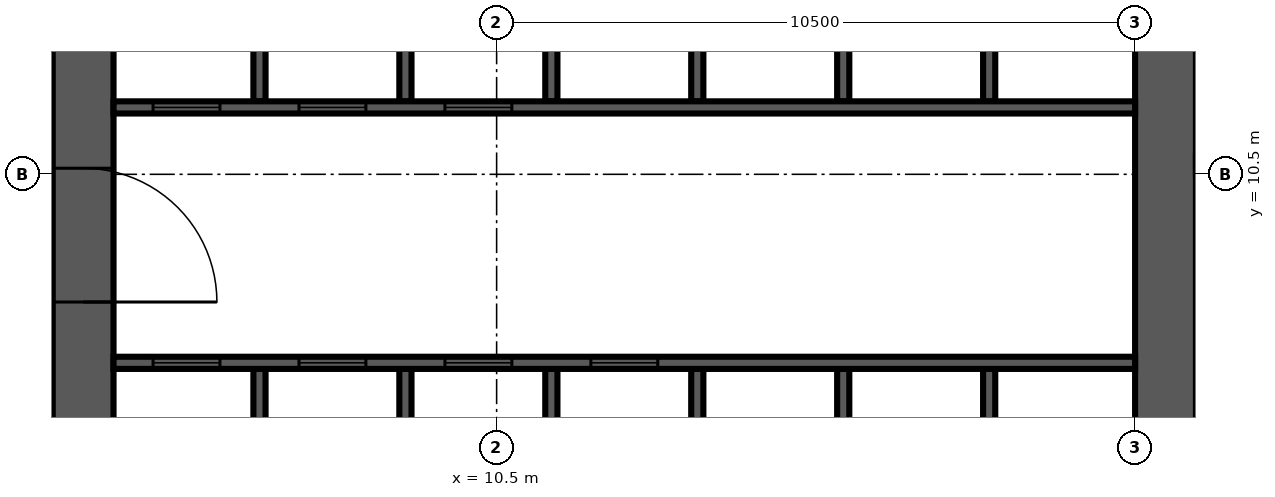
"""IFC4 building model, lengths in metres.
Left out: names, types, materials, properties, quantities, classifications, styles, units other than length and angle.
Written with IfcOpenShell. Run it as: python <this file> out.ifc"""

import sys

from ifc_helpers import new_model, si_unit, direction, frame, frame_2d, origin, place, context, subcontext, project, spatial, rectangle, extrude, source, transform, mapped, element, fill, save


model = new_model("IFC4")
c1 = context("Model", 3, precision=1e-05, world=origin(), true_north=direction((0.0, 1.0)))
c2 = subcontext(c1, "Body", "Model", "MODEL_VIEW")
j1 = project(units=[si_unit("LENGTHUNIT", "METRE"), si_unit("PLANEANGLEUNIT", "RADIAN")], contexts=[c1])
p1 = place(None, origin())
s1 = spatial("IfcSite", under=j1, at=p1, CompositionType="ELEMENT")
p2 = place(p1, origin())
s2 = spatial("IfcBuilding", under=s1, at=p2, CompositionType="ELEMENT")
p3 = place(p2, frame((0.0, 0.0, 149.7)))
s3 = spatial("IfcBuildingStorey", under=s2, at=p3, CompositionType="ELEMENT", Elevation=149.7)
m1 = source(origin(), c2, "Body", "SweptSolid", [
    extrude(rectangle(XDim=17.8, YDim=1.0, at=frame_2d((8.9, 0.0))), origin(), (0.0, 0.0, 1.0), 4.2),
])
p4 = place(p3, frame((3.7, 4.2, 0.0), z_axis=(0.0, 0.0, 1.0), x_axis=(0.0, 1.0, 0.0)))
e1 = element("IfcWall", 1, at=p4, inside=s3, PredefinedType="SHEAR", context=c2, shape_type="MappedRepresentation", body=[
    mapped(m1, transform((0.0, 0.0, 0.0), scale=1.0)),
])
m2 = source(origin(), c2, "Body", "SweptSolid", [
    extrude(rectangle(XDim=2.2, YDim=2.1, at=frame_2d((1.1, 1.05))), frame((0.0, 0.51, 0.0), z_axis=(0.0, -1.0, 0.0), x_axis=(1.0, 0.0, 0.0)), (0.0, 0.0, 1.0), 1.02),
])
p5 = place(p4, frame((4.2, 0.0, 0.0)))
e2 = element("IfcOpeningElement", 2, at=p5, cuts=e1, PredefinedType="OPENING", context=c2, shape_type="MappedRepresentation", body=[
    mapped(m2, transform((0.0, 0.0, 0.0), scale=1.0)),
])
m3 = source(origin(), c2, "Body", "SweptSolid", [
    extrude(rectangle(XDim=0.9, YDim=2.1, at=frame_2d((0.45, 1.05))), frame((0.0, 0.51, 0.0), z_axis=(0.0, -1.0, 0.0), x_axis=(1.0, 0.0, 0.0)), (0.0, 0.0, 1.0), 1.02),
])
p6 = place(p4, frame((10.95, 0.0, 0.0)))
e3 = element("IfcOpeningElement", 3, at=p6, cuts=e1, PredefinedType="OPENING", context=c2, shape_type="MappedRepresentation", body=[
    mapped(m3, transform((0.0, 0.0, 0.0), scale=1.0)),
])
m4 = source(origin(), c2, "Body", "SweptSolid", [
    extrude(rectangle(XDim=16.8, YDim=1.0, at=frame_2d((8.4, 0.0))), origin(), (0.0, 0.0, 1.0), 4.2),
])
p7 = place(p3, frame((21.5, 4.2, 0.0), z_axis=(0.0, 0.0, 1.0), x_axis=(0.0, 1.0, 0.0)))
e4 = element("IfcWall", 4, at=p7, inside=s3, PredefinedType="SHEAR", context=c2, shape_type="MappedRepresentation", body=[
    mapped(m4, transform((0.0, 0.0, 0.0), scale=1.0)),
])
m5 = source(origin(), c2, "Body", "SweptSolid", [
    extrude(rectangle(XDim=1.2, YDim=2.1, at=frame_2d((0.6, 1.05))), frame((0.0, 0.51, 0.0), z_axis=(0.0, -1.0, 0.0), x_axis=(1.0, 0.0, 0.0)), (0.0, 0.0, 1.0), 1.02),
])
p8 = place(p7, frame((14.7, 0.0, 0.0)))
e5 = element("IfcOpeningElement", 5, at=p8, cuts=e4, PredefinedType="OPENING", context=c2, shape_type="MappedRepresentation", body=[
    mapped(m5, transform((0.0, 0.0, 0.0), scale=1.0)),
])
m6 = source(origin(), c2, "Body", "SweptSolid", [
    extrude(rectangle(XDim=3.1, YDim=0.2, at=frame_2d((1.55, 0.0))), origin(), (0.0, 0.0, 1.0), 4.2),
])
for number, where, z_axis, x_axis in (
    (6, (6.6, 4.2, 0.0), (0.0, 0.0, 1.0), (0.0, 1.0, 0.0)),
    (7, (9.0, 4.2, 0.0), (0.0, 0.0, 1.0), (0.0, 1.0, 0.0)),
    (8, (11.4, 4.2, 0.0), (0.0, 0.0, 1.0), (0.0, 1.0, 0.0)),
    (9, (13.8, 4.2, 0.0), (0.0, 0.0, 1.0), (0.0, 1.0, 0.0)),
    (10, (16.2, 4.2, 0.0), (0.0, 0.0, 1.0), (0.0, 1.0, 0.0)),
    (11, (18.6, 4.2, 0.0), (0.0, 0.0, 1.0), (0.0, 1.0, 0.0)),
):
    element("IfcWall", number, at=place(p3, frame(where, z_axis=z_axis, x_axis=x_axis)), inside=s3, PredefinedType="SOLIDWALL", context=c2, shape_type="MappedRepresentation", body=[
        mapped(m6, transform((0.0, 0.0, 0.0), scale=1.0)),
    ])
m7 = source(origin(), c2, "Body", "SweptSolid", [
    extrude(rectangle(XDim=3.0, YDim=0.2, at=frame_2d((1.5, 0.0))), origin(), (0.0, 0.0, 1.0), 4.2),
])
for number, where, z_axis, x_axis in (
    (12, (6.6, 11.7, 0.0), (0.0, 0.0, 1.0), (0.0, 1.0, 0.0)),
    (13, (9.0, 11.7, 0.0), (0.0, 0.0, 1.0), (0.0, 1.0, 0.0)),
    (14, (11.4, 11.7, 0.0), (0.0, 0.0, 1.0), (0.0, 1.0, 0.0)),
    (15, (13.8, 11.7, 0.0), (0.0, 0.0, 1.0), (0.0, 1.0, 0.0)),
    (16, (16.2, 11.7, 0.0), (0.0, 0.0, 1.0), (0.0, 1.0, 0.0)),
    (17, (18.6, 11.7, 0.0), (0.0, 0.0, 1.0), (0.0, 1.0, 0.0)),
):
    element("IfcWall", number, at=place(p3, frame(where, z_axis=z_axis, x_axis=x_axis)), inside=s3, PredefinedType="SOLIDWALL", context=c2, shape_type="MappedRepresentation", body=[
        mapped(m7, transform((0.0, 0.0, 0.0), scale=1.0)),
    ])
m8 = source(origin(), c2, "Body", "SweptSolid", [
    extrude(rectangle(XDim=16.8, YDim=0.2, at=frame_2d((8.4, 0.0))), origin(), (0.0, 0.0, 1.0), 4.2),
])
p9 = place(p3, frame((4.2, 7.4, 0.0), z_axis=(0.0, 0.0, 1.0), x_axis=(1.0, 0.0, 0.0)))
e18 = element("IfcWall", 18, at=p9, inside=s3, PredefinedType="SOLIDWALL", context=c2, shape_type="MappedRepresentation", body=[
    mapped(m8, transform((0.0, 0.0, 0.0), scale=1.0)),
])
m9 = source(origin(), c2, "Body", "SweptSolid", [
    extrude(rectangle(XDim=1.1, YDim=2.1, at=frame_2d((0.55, 1.05))), frame((0.0, 0.11, 0.0), z_axis=(0.0, -1.0, 0.0), x_axis=(1.0, 0.0, 0.0)), (0.0, 0.0, 1.0), 0.22),
])
p10 = place(p9, frame((0.65, 0.0, 0.0)))
e19 = element("IfcOpeningElement", 19, at=p10, cuts=e18, PredefinedType="OPENING", context=c2, shape_type="MappedRepresentation", body=[
    mapped(m9, transform((0.0, 0.0, 0.0), scale=1.0)),
])
p11 = place(p9, frame((3.05, 0.0, 0.0)))
e20 = element("IfcOpeningElement", 20, at=p11, cuts=e18, PredefinedType="OPENING", context=c2, shape_type="MappedRepresentation", body=[
    mapped(m9, transform((0.0, 0.0, 0.0), scale=1.0)),
])
p12 = place(p9, frame((5.45, 0.0, 0.0)))
e21 = element("IfcOpeningElement", 21, at=p12, cuts=e18, PredefinedType="OPENING", context=c2, shape_type="MappedRepresentation", body=[
    mapped(m9, transform((0.0, 0.0, 0.0), scale=1.0)),
])
p13 = place(p9, frame((7.85, 0.0, 0.0)))
e22 = element("IfcOpeningElement", 22, at=p13, cuts=e18, PredefinedType="OPENING", context=c2, shape_type="MappedRepresentation", body=[
    mapped(m9, transform((0.0, 0.0, 0.0), scale=1.0)),
])
p14 = place(p3, frame((4.2, 11.6, 0.0), z_axis=(0.0, 0.0, 1.0), x_axis=(1.0, 0.0, 0.0)))
e23 = element("IfcWall", 23, at=p14, inside=s3, PredefinedType="SOLIDWALL", context=c2, shape_type="MappedRepresentation", body=[
    mapped(m8, transform((0.0, 0.0, 0.0), scale=1.0)),
])
p15 = place(p14, frame((0.65, 0.0, 0.0)))
e24 = element("IfcOpeningElement", 24, at=p15, cuts=e23, PredefinedType="OPENING", context=c2, shape_type="MappedRepresentation", body=[
    mapped(m9, transform((0.0, 0.0, 0.0), scale=1.0)),
])
p16 = place(p14, frame((3.05, 0.0, 0.0)))
e25 = element("IfcOpeningElement", 25, at=p16, cuts=e23, PredefinedType="OPENING", context=c2, shape_type="MappedRepresentation", body=[
    mapped(m9, transform((0.0, 0.0, 0.0), scale=1.0)),
])
p17 = place(p14, frame((5.45, 0.0, 0.0)))
e26 = element("IfcOpeningElement", 26, at=p17, cuts=e23, PredefinedType="OPENING", context=c2, shape_type="MappedRepresentation", body=[
    mapped(m9, transform((0.0, 0.0, 0.0), scale=1.0)),
])
m10 = source(origin(), c2, "Body", "SweptSolid", [
    extrude(rectangle(XDim=1.1, YDim=2.1, at=frame_2d((0.55, 1.05))), frame((0.0, 0.025, 0.0), z_axis=(0.0, -1.0, 0.0), x_axis=(1.0, 0.0, 0.0)), (0.0, 0.0, 1.0), 0.05),
])
p18 = place(p10, origin())
e27 = element("IfcDoor", 27, at=p18, inside=s3, OperationType="SLIDING_TO_LEFT", PredefinedType="DOOR", context=c2, shape_type="MappedRepresentation", body=[
    mapped(m10, transform((0.0, 0.0, 0.0), scale=1.0)),
])
fill(e19, e27)
p19 = place(p11, origin())
e28 = element("IfcDoor", 28, at=p19, inside=s3, OperationType="SLIDING_TO_LEFT", PredefinedType="DOOR", context=c2, shape_type="MappedRepresentation", body=[
    mapped(m10, transform((0.0, 0.0, 0.0), scale=1.0)),
])
fill(e20, e28)
p20 = place(p12, origin())
e29 = element("IfcDoor", 29, at=p20, inside=s3, OperationType="SLIDING_TO_LEFT", PredefinedType="DOOR", context=c2, shape_type="MappedRepresentation", body=[
    mapped(m10, transform((0.0, 0.0, 0.0), scale=1.0)),
])
fill(e21, e29)
p21 = place(p13, origin())
e30 = element("IfcDoor", 30, at=p21, inside=s3, OperationType="SLIDING_TO_LEFT", PredefinedType="DOOR", context=c2, shape_type="MappedRepresentation", body=[
    mapped(m10, transform((0.0, 0.0, 0.0), scale=1.0)),
])
fill(e22, e30)
p22 = place(p15, origin())
e31 = element("IfcDoor", 31, at=p22, inside=s3, OperationType="SLIDING_TO_LEFT", PredefinedType="DOOR", context=c2, shape_type="MappedRepresentation", body=[
    mapped(m10, transform((0.0, 0.0, 0.0), scale=1.0)),
])
fill(e24, e31)
p23 = place(p16, origin())
e32 = element("IfcDoor", 32, at=p23, inside=s3, OperationType="SLIDING_TO_LEFT", PredefinedType="DOOR", context=c2, shape_type="MappedRepresentation", body=[
    mapped(m10, transform((0.0, 0.0, 0.0), scale=1.0)),
])
fill(e25, e32)
p24 = place(p17, origin())
e33 = element("IfcDoor", 33, at=p24, inside=s3, OperationType="SLIDING_TO_LEFT", PredefinedType="DOOR", context=c2, shape_type="MappedRepresentation", body=[
    mapped(m10, transform((0.0, 0.0, 0.0), scale=1.0)),
])
fill(e26, e33)
m11 = source(origin(), c2, "Body", "SweptSolid", [
    extrude(rectangle(XDim=2.2, YDim=2.1, at=frame_2d((1.1, 1.05))), frame((0.0, 0.025, 0.0), z_axis=(0.0, -1.0, 0.0), x_axis=(1.0, 0.0, 0.0)), (0.0, 0.0, 1.0), 0.05),
])
p25 = place(p5, origin())
e34 = element("IfcDoor", 34, at=p25, inside=s3, OperationType="DOUBLE_DOOR_SINGLE_SWING", PredefinedType="DOOR", context=c2, shape_type="MappedRepresentation", body=[
    mapped(m11, transform((0.0, 0.0, 0.0), scale=1.0)),
])
fill(e2, e34)
save(model, sys.argv[1])
